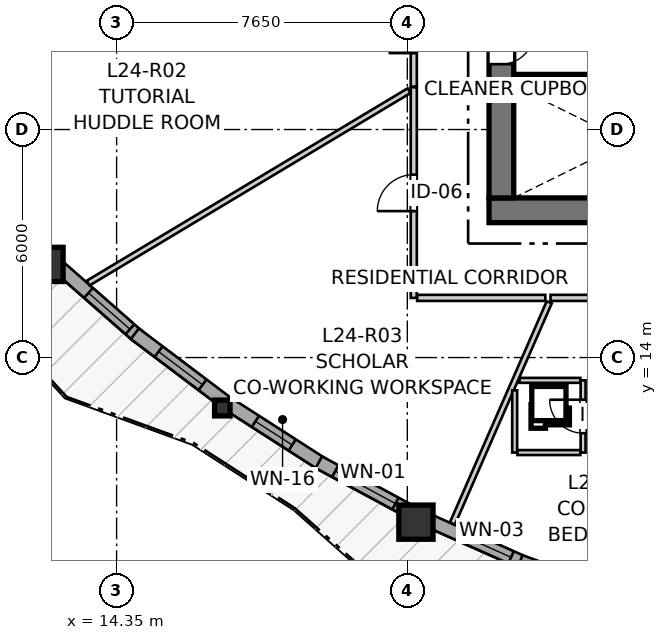
"""IFC4 building model, lengths in metres.
Left out: names, types, materials, properties, quantities, classifications, styles, units other than length and angle.
Written with IfcOpenShell. Run it as: python <this file> out.ifc"""

import sys

from ifc_helpers import new_model, si_unit, direction, frame, frame_2d, origin, origin_2d, place, context, subcontext, project, spatial, rectangle, i_section, extrude, source, transform, mapped, element, fill, save


model = new_model("IFC4")
c1 = context("Model", 3, precision=1e-05, world=origin(), true_north=direction((0.0, 1.0)))
c2 = subcontext(c1, "Body", "Model", "MODEL_VIEW")
j1 = project(units=[si_unit("LENGTHUNIT", "METRE"), si_unit("PLANEANGLEUNIT", "RADIAN")], contexts=[c1])
p1 = place(None, origin())
s1 = spatial("IfcSite", under=j1, at=p1, CompositionType="ELEMENT")
p2 = place(p1, origin())
s2 = spatial("IfcBuilding", under=s1, at=p2, CompositionType="ELEMENT")
p3 = place(p2, frame((0.0, 0.0, 83.2)))
s3 = spatial("IfcBuildingStorey", under=s2, at=p3, CompositionType="ELEMENT", Elevation=83.2)
p4 = place(p3, frame((24.15, 17.875, 0.0), z_axis=(0.0, 0.0, 1.0), x_axis=(1.0, 0.0, 0.0)))
e1 = element("IfcWall", 1, at=p4, inside=s3, PredefinedType="SHEAR", context=c2, shape_type="SweptSolid", body=[
    extrude(rectangle(XDim=12.4, YDim=0.65, at=frame_2d((6.2, 0.0))), origin(), (0.0, 0.0, 1.0), 2.935),
])
p5 = place(p3, frame((24.475, 33.8, 0.0), z_axis=(0.0, 0.0, 1.0), x_axis=(0.0, -1.0, 0.0)))
e2 = element("IfcWall", 2, at=p5, inside=s3, PredefinedType="SHEAR", context=c2, shape_type="SweptSolid", body=[
    extrude(rectangle(XDim=15.6, YDim=0.65, at=frame_2d((7.8, 0.0))), origin(), (0.0, 0.0, 1.0), 2.935),
])
p6 = place(p5, frame((7.05, 0.0, 0.0)))
e3 = element("IfcOpeningElement", 3, at=p6, cuts=e2, PredefinedType="OPENING", context=c2, shape_type="SweptSolid", body=[
    extrude(rectangle(XDim=1.5, YDim=2.15, at=frame_2d((0.75, 1.075))), frame((0.0, 0.335, 0.0), z_axis=(0.0, -1.0, 0.0), x_axis=(1.0, 0.0, 0.0)), (0.0, 0.0, 1.0), 0.67),
])
p7 = place(p5, frame((3.52, 0.0, 0.0)))
e4 = element("IfcOpeningElement", 4, at=p7, cuts=e2, PredefinedType="OPENING", context=c2, shape_type="SweptSolid", body=[
    extrude(rectangle(XDim=0.86, YDim=2.05, at=frame_2d((0.43, 1.025))), frame((0.0, 0.335, 0.0), z_axis=(0.0, -1.0, 0.0), x_axis=(1.0, 0.0, 0.0)), (0.0, 0.0, 1.0), 0.67),
])
p8 = place(p5, frame((11.22, 0.0, 0.0)))
e5 = element("IfcOpeningElement", 5, at=p8, cuts=e2, PredefinedType="OPENING", context=c2, shape_type="SweptSolid", body=[
    extrude(rectangle(XDim=0.86, YDim=2.05, at=frame_2d((0.43, 1.025))), frame((0.0, 0.335, 0.0), z_axis=(0.0, -1.0, 0.0), x_axis=(1.0, 0.0, 0.0)), (0.0, 0.0, 1.0), 0.67),
])
p9 = place(p3, frame((24.8, 21.3, 0.0), z_axis=(0.0, 0.0, 1.0), x_axis=(1.0, 0.0, 0.0)))
e6 = element("IfcWall", 6, at=p9, inside=s3, PredefinedType="SHEAR", context=c2, shape_type="SweptSolid", body=[
    extrude(rectangle(XDim=11.1, YDim=0.3, at=frame_2d((5.55, 0.0))), origin(), (0.0, 0.0, 1.0), 2.935),
])
p10 = place(p9, frame((6.22, 0.0, 0.0)))
e7 = element("IfcOpeningElement", 7, at=p10, cuts=e6, PredefinedType="OPENING", context=c2, shape_type="SweptSolid", body=[
    extrude(rectangle(XDim=0.98, YDim=2.15, at=frame_2d((0.49, 1.075))), frame((0.0, 0.16, 0.0), z_axis=(0.0, -1.0, 0.0), x_axis=(1.0, 0.0, 0.0)), (0.0, 0.0, 1.0), 0.32),
])
p11 = place(p9, frame((9.15, 0.0, 0.0)))
e8 = element("IfcOpeningElement", 8, at=p11, cuts=e6, PredefinedType="OPENING", context=c2, shape_type="SweptSolid", body=[
    extrude(rectangle(XDim=1.15, YDim=2.15, at=frame_2d((0.575, 1.075))), frame((0.0, 0.16, 0.0), z_axis=(0.0, -1.0, 0.0), x_axis=(1.0, 0.0, 0.0)), (0.0, 0.0, 1.0), 0.32),
])
m1 = source(origin(), c2, "Body", "SweptSolid", [
    extrude(rectangle(XDim=0.9, YDim=0.9, at=origin_2d()), origin(), (0.0, 0.0, 1.0), 2.935),
])
p12 = place(p3, frame((12.493, 16.451, 0.0), z_axis=(0.0, 0.0, 1.0), x_axis=(1.0, 0.0, 0.0)))
e9 = element("IfcColumn", 9, at=p12, inside=s3, PredefinedType="COLUMN", context=c2, shape_type="MappedRepresentation", body=[
    mapped(m1, transform((0.0, 0.0, 0.0), x_axis=(1.0, 0.0, 0.0), y_axis=(0.0, 1.0, 0.0), z_axis=(0.0, 0.0, 1.0), scale=1.0)),
])
m2 = source(origin(), c2, "Body", "SweptSolid", [
    extrude(i_section(OverallWidth=0.406, OverallDepth=0.416, WebThickness=0.027, FlangeThickness=0.044, FilletRadius=0.015, at=origin_2d()), origin(), (0.0, 0.0, 1.0), 2.935),
])
p13 = place(p3, frame((17.131, 12.673, 0.0), z_axis=(0.0, 0.0, 1.0), x_axis=(1.0, 0.0, 0.0)))
e10 = element("IfcColumn", 10, at=p13, inside=s3, PredefinedType="PILASTER", context=c2, shape_type="MappedRepresentation", body=[
    mapped(m2, transform((0.0, 0.0, 0.0), x_axis=(1.0, 0.0, 0.0), y_axis=(0.0, 1.0, 0.0), z_axis=(0.0, 0.0, 1.0), scale=1.0)),
])
p14 = place(p3, frame((22.227, 9.669, 0.0), z_axis=(0.0, 0.0, 1.0), x_axis=(1.0, 0.0, 0.0)))
e11 = element("IfcColumn", 11, at=p14, inside=s3, PredefinedType="COLUMN", context=c2, shape_type="MappedRepresentation", body=[
    mapped(m1, transform((0.0, 0.0, 0.0), x_axis=(1.0, 0.0, 0.0), y_axis=(0.0, 1.0, 0.0), z_axis=(0.0, 0.0, 1.0), scale=1.0)),
])
p15 = place(p3, frame((12.777, 16.434, 0.0), z_axis=(0.0, 0.0, 1.0), x_axis=(0.751531192513, -0.659697556976, 0.0)))
e12 = element("IfcWall", 12, at=p15, inside=s3, PredefinedType="SOLIDWALL", context=c2, shape_type="SweptSolid", body=[
    extrude(rectangle(XDim=2.823, YDim=0.35, at=frame_2d((1.412, 0.0))), origin(), (0.0, 0.0, 1.0), 2.465),
])
p16 = place(p15, frame((1.11, 0.0, 0.82)))
e13 = element("IfcOpeningElement", 13, at=p16, cuts=e12, PredefinedType="OPENING", context=c2, shape_type="SweptSolid", body=[
    extrude(rectangle(XDim=1.45, YDim=1.25, at=frame_2d((0.725, 0.625))), frame((0.0, 0.185, 0.0), z_axis=(0.0, -1.0, 0.0), x_axis=(1.0, 0.0, 0.0)), (0.0, 0.0, 1.0), 0.37),
])
p17 = place(p3, frame((14.83, 14.627, 0.0), z_axis=(0.0, 0.0, 1.0), x_axis=(0.798382892471, -0.602150111691, 0.0)))
e14 = element("IfcWall", 14, at=p17, inside=s3, PredefinedType="SOLIDWALL", context=c2, shape_type="SweptSolid", body=[
    extrude(rectangle(XDim=2.995, YDim=0.35, at=frame_2d((1.497, 0.0))), origin(), (0.0, 0.0, 1.0), 2.465),
])
p18 = place(p17, frame((0.782, 0.0, 0.82)))
e15 = element("IfcOpeningElement", 15, at=p18, cuts=e14, PredefinedType="OPENING", context=c2, shape_type="SweptSolid", body=[
    extrude(rectangle(XDim=1.45, YDim=1.25, at=frame_2d((0.725, 0.625))), frame((0.0, 0.185, 0.0), z_axis=(0.0, -1.0, 0.0), x_axis=(1.0, 0.0, 0.0)), (0.0, 0.0, 1.0), 0.37),
])
p19 = place(p3, frame((17.243, 12.809, 0.0), z_axis=(0.0, 0.0, 1.0), x_axis=(0.84150067635, -0.540256061236, 0.0)))
e16 = element("IfcWall", 16, at=p19, inside=s3, PredefinedType="SOLIDWALL", context=c2, shape_type="SweptSolid", body=[
    extrude(rectangle(XDim=2.978, YDim=0.35, at=frame_2d((1.489, 0.0))), origin(), (0.0, 0.0, 1.0), 2.465),
])
p20 = place(p19, frame((0.904, 0.0, 0.82)))
e17 = element("IfcOpeningElement", 17, at=p20, cuts=e16, PredefinedType="OPENING", context=c2, shape_type="SweptSolid", body=[
    extrude(rectangle(XDim=1.15, YDim=1.2, at=frame_2d((0.575, 0.6))), frame((0.0, 0.185, 0.0), z_axis=(0.0, -1.0, 0.0), x_axis=(1.0, 0.0, 0.0)), (0.0, 0.0, 1.0), 0.37),
])
p21 = place(p3, frame((19.671, 11.246, 0.0), z_axis=(0.0, 0.0, 1.0), x_axis=(0.880120285763, -0.474750758387, 0.0)))
e18 = element("IfcWall", 18, at=p21, inside=s3, PredefinedType="SOLIDWALL", context=c2, shape_type="SweptSolid", body=[
    extrude(rectangle(XDim=2.773, YDim=0.35, at=frame_2d((1.386, 0.0))), origin(), (0.0, 0.0, 1.0), 2.465),
])
p22 = place(p21, frame((0.491, 0.0, 0.82)))
e19 = element("IfcOpeningElement", 19, at=p22, cuts=e18, PredefinedType="OPENING", context=c2, shape_type="SweptSolid", body=[
    extrude(rectangle(XDim=1.8, YDim=1.45, at=frame_2d((0.9, 0.725))), frame((0.0, 0.185, 0.0), z_axis=(0.0, -1.0, 0.0), x_axis=(1.0, 0.0, 0.0)), (0.0, 0.0, 1.0), 0.37),
])
p23 = place(p3, frame((22.503, 9.737, 0.0), z_axis=(0.0, 0.0, 1.0), x_axis=(0.913443049169, -0.406966578388, 0.0)))
e20 = element("IfcWall", 20, at=p23, inside=s3, PredefinedType="SOLIDWALL", context=c2, shape_type="SweptSolid", body=[
    extrude(rectangle(XDim=2.79, YDim=0.35, at=frame_2d((1.395, 0.0))), origin(), (0.0, 0.0, 1.0), 2.465),
])
p24 = place(p23, frame((0.938, 0.0, 0.82)))
e21 = element("IfcOpeningElement", 21, at=p24, cuts=e20, PredefinedType="OPENING", context=c2, shape_type="SweptSolid", body=[
    extrude(rectangle(XDim=1.5, YDim=1.45, at=frame_2d((0.75, 0.725))), frame((0.0, 0.185, 0.0), z_axis=(0.0, -1.0, 0.0), x_axis=(1.0, 0.0, 0.0)), (0.0, 0.0, 1.0), 0.37),
])
p25 = place(p3, frame((24.969, 8.635, 0.0), z_axis=(0.0, 0.0, 1.0), x_axis=(0.941099972293, -0.338128440315, 0.0)))
e22 = element("IfcWall", 22, at=p25, inside=s3, PredefinedType="SOLIDWALL", context=c2, shape_type="SweptSolid", body=[
    extrude(rectangle(XDim=3.028, YDim=0.35, at=frame_2d((1.514, 0.0))), origin(), (0.0, 0.0, 1.0), 2.465),
])
p26 = place(p25, frame((0.774, 0.0, 0.82)))
e23 = element("IfcOpeningElement", 23, at=p26, cuts=e22, PredefinedType="OPENING", context=c2, shape_type="SweptSolid", body=[
    extrude(rectangle(XDim=1.5, YDim=1.45, at=frame_2d((0.75, 0.725))), frame((0.0, 0.185, 0.0), z_axis=(0.0, -1.0, 0.0), x_axis=(1.0, 0.0, 0.0)), (0.0, 0.0, 1.0), 0.37),
])
p27 = place(p3, frame((22.17, 15.57, 0.0), z_axis=(0.0, 0.0, 1.0), x_axis=(0.0, 1.0, 0.0)))
e24 = element("IfcWall", 24, at=p27, inside=s3, PredefinedType="PARTITIONING", context=c2, shape_type="SweptSolid", body=[
    extrude(rectangle(XDim=5.543, YDim=0.16, at=frame_2d((2.771, 0.0))), origin(), (0.0, 0.0, 1.0), 2.935),
])
p28 = place(p27, frame((2.283, 0.0, 0.0)))
e25 = element("IfcOpeningElement", 25, at=p28, cuts=e24, PredefinedType="OPENING", context=c2, shape_type="SweptSolid", body=[
    extrude(rectangle(XDim=0.96, YDim=2.1, at=frame_2d((0.48, 1.05))), frame((0.0, 0.09, 0.0), z_axis=(0.0, -1.0, 0.0), x_axis=(1.0, 0.0, 0.0)), (0.0, 0.0, 1.0), 0.18),
])
p29 = place(p3, frame((29.438, 15.57, 0.0), z_axis=(0.0, 0.0, 1.0), x_axis=(-1.0, 0.0, 0.0)))
e26 = element("IfcWall", 26, at=p29, inside=s3, PredefinedType="PARTITIONING", context=c2, shape_type="SweptSolid", body=[
    extrude(rectangle(XDim=3.67, YDim=0.16, at=frame_2d((1.835, 0.0))), origin(), (0.0, 0.0, 1.0), 2.935),
])
p30 = place(p29, frame((1.374, 0.0, 0.0)))
e27 = element("IfcOpeningElement", 27, at=p30, cuts=e26, PredefinedType="OPENING", context=c2, shape_type="SweptSolid", body=[
    extrude(rectangle(XDim=0.92, YDim=2.1, at=frame_2d((0.46, 1.05))), frame((0.0, 0.09, 0.0), z_axis=(0.0, -1.0, 0.0), x_axis=(1.0, 0.0, 0.0)), (0.0, 0.0, 1.0), 0.18),
])
p31 = place(p3, frame((22.17, 21.128, 0.0), z_axis=(0.0, 0.0, 1.0), x_axis=(0.0, 1.0, 0.0)))
e28 = element("IfcWall", 28, at=p31, inside=s3, PredefinedType="PARTITIONING", context=c2, shape_type="SweptSolid", body=[
    extrude(rectangle(XDim=3.022, YDim=0.16, at=frame_2d((1.511, 0.0))), origin(), (0.0, 0.0, 1.0), 2.935),
])
p32 = place(p31, frame((0.883, 0.0, 0.0)))
e29 = element("IfcOpeningElement", 29, at=p32, cuts=e28, PredefinedType="OPENING", context=c2, shape_type="SweptSolid", body=[
    extrude(rectangle(XDim=1.3, YDim=2.1, at=frame_2d((0.65, 1.05))), frame((0.0, 0.09, 0.0), z_axis=(0.0, -1.0, 0.0), x_axis=(1.0, 0.0, 0.0)), (0.0, 0.0, 1.0), 0.18),
])
p33 = place(p3, frame((26.625, 11.5, 0.0), z_axis=(0.0, 0.0, 1.0), x_axis=(0.0, 1.0, 0.0)))
e30 = element("IfcWall", 30, at=p33, inside=s3, PredefinedType="PARTITIONING", context=c2, shape_type="SweptSolid", body=[
    extrude(rectangle(XDim=1.9, YDim=0.13, at=frame_2d((0.95, 0.0))), origin(), (0.0, 0.0, 1.0), 2.935),
])
p34 = place(p33, frame((0.51, 0.0, 0.0)))
e31 = element("IfcOpeningElement", 31, at=p34, cuts=e30, PredefinedType="OPENING", context=c2, shape_type="SweptSolid", body=[
    extrude(rectangle(XDim=0.88, YDim=2.05, at=frame_2d((0.44, 1.025))), frame((0.0, 0.075, 0.0), z_axis=(0.0, -1.0, 0.0), x_axis=(1.0, 0.0, 0.0)), (0.0, 0.0, 1.0), 0.15),
])
p35 = place(p3, frame((13.601, 15.958, 0.0), z_axis=(0.0, 0.0, 1.0), x_axis=(0.857661345212, 0.514214952066, 0.0)))
e32 = element("IfcWall", 32, at=p35, inside=s3, PredefinedType="PARTITIONING", context=c2, shape_type="SweptSolid", body=[
    extrude(rectangle(XDim=9.846, YDim=0.145, at=frame_2d((4.923, 0.0))), origin(), (0.0, 0.0, 1.0), 2.935),
])
p36 = place(p3, frame((23.186, 9.634, 0.0), z_axis=(0.0, 0.0, 1.0), x_axis=(0.400994208685, 0.916080588486, 0.0)))
e33 = element("IfcWall", 33, at=p36, inside=s3, PredefinedType="PARTITIONING", context=c2, shape_type="SweptSolid", body=[
    extrude(rectangle(XDim=6.353, YDim=0.145, at=frame_2d((3.177, 0.0))), origin(), (0.0, 0.0, 1.0), 2.935),
])
p37 = place(p3, frame((22.258, 15.57, 0.0), z_axis=(0.0, 0.0, 1.0), x_axis=(1.0, 0.0, 0.0)))
e34 = element("IfcWall", 34, at=p37, inside=s3, PredefinedType="PARTITIONING", context=c2, shape_type="SweptSolid", body=[
    extrude(rectangle(XDim=3.373, YDim=0.16, at=frame_2d((1.687, 0.0))), origin(), (0.0, 0.0, 1.0), 2.935),
])
p38 = place(p3, frame((24.825, 11.5, 0.0), z_axis=(0.0, 0.0, 1.0), x_axis=(0.0, 1.0, 0.0)))
e35 = element("IfcWall", 35, at=p38, inside=s3, PredefinedType="PARTITIONING", context=c2, shape_type="SweptSolid", body=[
    extrude(rectangle(XDim=1.637, YDim=0.13, at=frame_2d((0.818, 0.0))), origin(), (0.0, 0.0, 1.0), 2.935),
])
p39 = place(p3, frame((24.898, 11.5, 0.0), z_axis=(0.0, 0.0, 1.0), x_axis=(1.0, 0.0, 0.0)))
e36 = element("IfcWall", 36, at=p39, inside=s3, PredefinedType="PARTITIONING", context=c2, shape_type="SweptSolid", body=[
    extrude(rectangle(XDim=1.654, YDim=0.13, at=frame_2d((0.827, 0.0))), origin(), (0.0, 0.0, 1.0), 2.543),
])
p40 = place(p3, frame((24.951, 13.4, 0.0), z_axis=(0.0, 0.0, 1.0), x_axis=(1.0, 0.0, 0.0)))
e37 = element("IfcWall", 37, at=p40, inside=s3, PredefinedType="PARTITIONING", context=c2, shape_type="SweptSolid", body=[
    extrude(rectangle(XDim=1.601, YDim=0.13, at=frame_2d((0.801, 0.0))), origin(), (0.0, 0.0, 1.0), 2.935),
])
m3 = source(origin(), c2, "Body", "SweptSolid", [
    extrude(rectangle(XDim=1.45, YDim=1.25, at=frame_2d((0.725, 0.625))), frame((0.0, 0.03, 0.0), z_axis=(0.0, -1.0, 0.0), x_axis=(1.0, 0.0, 0.0)), (0.0, 0.0, 1.0), 0.06),
])
p41 = place(p16, origin())
e38 = element("IfcWindow", 38, at=p41, inside=s3, PartitioningType="SINGLE_PANEL", PredefinedType="WINDOW", context=c2, shape_type="MappedRepresentation", body=[
    mapped(m3, transform((0.0, 0.0, 0.0), x_axis=(1.0, 0.0, 0.0), y_axis=(0.0, 1.0, 0.0), z_axis=(0.0, 0.0, 1.0), scale=1.0)),
])
fill(e13, e38)
p42 = place(p18, origin())
e39 = element("IfcWindow", 39, at=p42, inside=s3, PartitioningType="SINGLE_PANEL", PredefinedType="WINDOW", context=c2, shape_type="MappedRepresentation", body=[
    mapped(m3, transform((0.0, 0.0, 0.0), x_axis=(1.0, 0.0, 0.0), y_axis=(0.0, 1.0, 0.0), z_axis=(0.0, 0.0, 1.0), scale=1.0)),
])
fill(e15, e39)
m4 = source(origin(), c2, "Body", "SweptSolid", [
    extrude(rectangle(XDim=1.15, YDim=1.2, at=frame_2d((0.575, 0.6))), frame((0.0, 0.03, 0.0), z_axis=(0.0, -1.0, 0.0), x_axis=(1.0, 0.0, 0.0)), (0.0, 0.0, 1.0), 0.06),
])
p43 = place(p20, origin())
e40 = element("IfcWindow", 40, at=p43, inside=s3, PartitioningType="SINGLE_PANEL", PredefinedType="WINDOW", context=c2, shape_type="MappedRepresentation", body=[
    mapped(m4, transform((0.0, 0.0, 0.0), x_axis=(1.0, 0.0, 0.0), y_axis=(0.0, 1.0, 0.0), z_axis=(0.0, 0.0, 1.0), scale=1.0)),
])
fill(e17, e40)
m5 = source(origin(), c2, "Body", "SweptSolid", [
    extrude(rectangle(XDim=1.8, YDim=1.45, at=frame_2d((0.9, 0.725))), frame((0.0, 0.03, 0.0), z_axis=(0.0, -1.0, 0.0), x_axis=(1.0, 0.0, 0.0)), (0.0, 0.0, 1.0), 0.06),
])
p44 = place(p22, origin())
e41 = element("IfcWindow", 41, at=p44, inside=s3, PartitioningType="SINGLE_PANEL", PredefinedType="WINDOW", context=c2, shape_type="MappedRepresentation", body=[
    mapped(m5, transform((0.0, 0.0, 0.0), x_axis=(1.0, 0.0, 0.0), y_axis=(0.0, 1.0, 0.0), z_axis=(0.0, 0.0, 1.0), scale=1.0)),
])
fill(e19, e41)
m6 = source(origin(), c2, "Body", "SweptSolid", [
    extrude(rectangle(XDim=1.5, YDim=1.45, at=frame_2d((0.75, 0.725))), frame((0.0, 0.03, 0.0), z_axis=(0.0, -1.0, 0.0), x_axis=(1.0, 0.0, 0.0)), (0.0, 0.0, 1.0), 0.06),
])
p45 = place(p24, origin())
e42 = element("IfcWindow", 42, at=p45, inside=s3, PartitioningType="SINGLE_PANEL", PredefinedType="WINDOW", context=c2, shape_type="MappedRepresentation", body=[
    mapped(m6, transform((0.0, 0.0, 0.0), x_axis=(1.0, 0.0, 0.0), y_axis=(0.0, 1.0, 0.0), z_axis=(0.0, 0.0, 1.0), scale=1.0)),
])
fill(e21, e42)
m7 = source(origin(), c2, "Body", "SweptSolid", [
    extrude(rectangle(XDim=0.86, YDim=2.05, at=frame_2d((0.43, 1.025))), frame((0.0, 0.025, 0.0), z_axis=(0.0, -1.0, 0.0), x_axis=(1.0, 0.0, 0.0)), (0.0, 0.0, 1.0), 0.05),
])
p46 = place(p8, origin())
e43 = element("IfcDoor", 43, at=p46, inside=s3, OperationType="SINGLE_SWING_LEFT", PredefinedType="DOOR", context=c2, shape_type="MappedRepresentation", body=[
    mapped(m7, transform((0.0, 0.0, 0.0), x_axis=(1.0, 0.0, 0.0), y_axis=(0.0, 1.0, 0.0), z_axis=(0.0, 0.0, 1.0), scale=1.0)),
])
fill(e5, e43)
m8 = source(origin(), c2, "Body", "SweptSolid", [
    extrude(rectangle(XDim=0.96, YDim=2.1, at=frame_2d((0.48, 1.05))), frame((0.0, 0.025, 0.0), z_axis=(0.0, -1.0, 0.0), x_axis=(1.0, 0.0, 0.0)), (0.0, 0.0, 1.0), 0.05),
])
p47 = place(p28, origin())
e44 = element("IfcDoor", 44, at=p47, inside=s3, OperationType="SINGLE_SWING_LEFT", PredefinedType="DOOR", context=c2, shape_type="MappedRepresentation", body=[
    mapped(m8, transform((0.0, 0.0, 0.0), x_axis=(1.0, 0.0, 0.0), y_axis=(0.0, 1.0, 0.0), z_axis=(0.0, 0.0, 1.0), scale=1.0)),
])
fill(e25, e44)
m9 = source(origin(), c2, "Body", "SweptSolid", [
    extrude(rectangle(XDim=1.3, YDim=2.1, at=frame_2d((0.65, 1.05))), frame((0.0, 0.025, 0.0), z_axis=(0.0, -1.0, 0.0), x_axis=(1.0, 0.0, 0.0)), (0.0, 0.0, 1.0), 0.05),
])
p48 = place(p32, origin())
e45 = element("IfcDoor", 45, at=p48, inside=s3, OperationType="DOUBLE_DOOR_SINGLE_SWING", PredefinedType="DOOR", context=c2, shape_type="MappedRepresentation", body=[
    mapped(m9, transform((0.0, 0.0, 0.0), x_axis=(1.0, 0.0, 0.0), y_axis=(0.0, 1.0, 0.0), z_axis=(0.0, 0.0, 1.0), scale=1.0)),
])
fill(e29, e45)
m10 = source(origin(), c2, "Body", "SweptSolid", [
    extrude(rectangle(XDim=0.88, YDim=2.05, at=frame_2d((0.44, 1.025))), frame((0.0, 0.025, 0.0), z_axis=(0.0, -1.0, 0.0), x_axis=(1.0, 0.0, 0.0)), (0.0, 0.0, 1.0), 0.05),
])
p49 = place(p34, origin())
e46 = element("IfcDoor", 46, at=p49, inside=s3, OperationType="SINGLE_SWING_RIGHT", PredefinedType="DOOR", context=c2, shape_type="MappedRepresentation", body=[
    mapped(m10, transform((0.0, 0.0, 0.0), x_axis=(1.0, 0.0, 0.0), y_axis=(0.0, 1.0, 0.0), z_axis=(0.0, 0.0, 1.0), scale=1.0)),
])
fill(e31, e46)
save(model, sys.argv[1])
